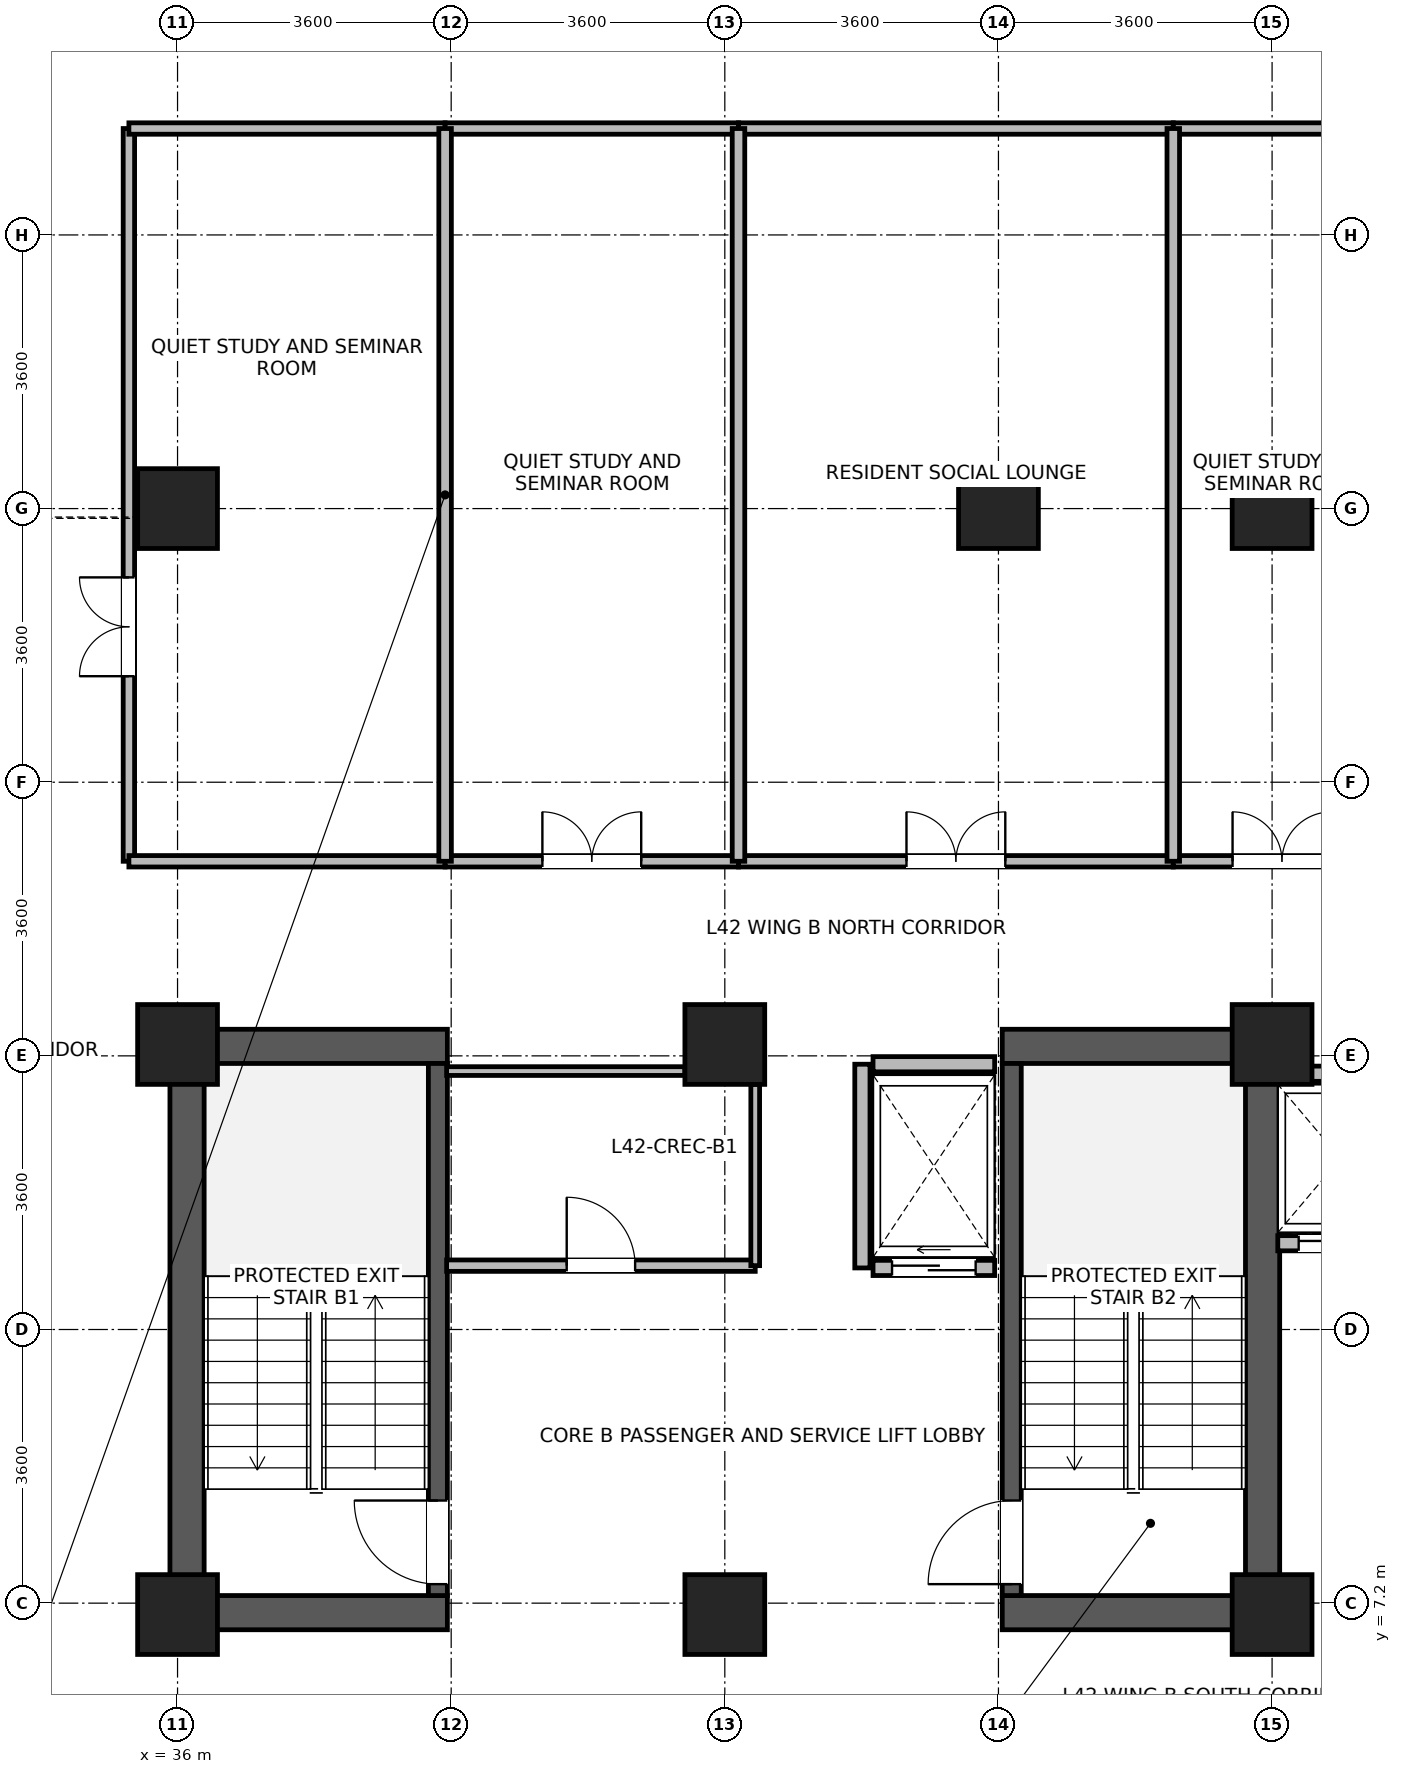
"""IFC4 building model, lengths in metres.
Left out: names, types, materials, properties, quantities, classifications, styles, units other than length and angle.
Written with IfcOpenShell. Run it as: python <this file> out.ifc"""

import sys

from ifc_helpers import new_model, si_unit, direction, frame, frame_2d, origin, origin_2d, place, context, subcontext, project, spatial, rectangle, extrude, source, transform, mapped, element, fill, save


model = new_model("IFC4")
c1 = context("Model", 3, precision=1e-05, world=origin(), true_north=direction((0.0, 1.0)))
c2 = subcontext(c1, "Body", "Model", "MODEL_VIEW")
j1 = project(units=[si_unit("LENGTHUNIT", "METRE"), si_unit("PLANEANGLEUNIT", "RADIAN")], contexts=[c1])
p1 = place(None, origin())
s1 = spatial("IfcSite", under=j1, at=p1, CompositionType="ELEMENT")
p2 = place(p1, origin())
s2 = spatial("IfcBuilding", under=s1, at=p2, CompositionType="ELEMENT")
p3 = place(p2, frame((0.0, 0.0, 166.1)))
s3 = spatial("IfcBuildingStorey", under=s2, at=p3, CompositionType="ELEMENT", Elevation=166.1)
for number, where, z_axis, x_axis in (
    (1, (36.125, 6.85, 0.0), (0.0, 0.0, 1.0), (0.0, 1.0, 0.0)),
    (2, (50.275, 6.85, 0.0), (0.0, 0.0, 1.0), (0.0, 1.0, 0.0)),
):
    element("IfcWall", number, at=place(p3, frame(where, z_axis=z_axis, x_axis=x_axis)), inside=s3, PredefinedType="SHEAR", context=c2, shape_type="SweptSolid", body=[
        extrude(rectangle(XDim=7.9, YDim=0.45, at=frame_2d((3.95, 0.0))), origin(), (0.0, 0.0, 1.0), 3.46),
    ])
for number, where, z_axis, x_axis in (
    (3, (36.35, 7.075, 0.0), (0.0, 0.0, 1.0), (1.0, 0.0, 0.0)),
    (4, (46.85, 7.075, 0.0), (0.0, 0.0, 1.0), (1.0, 0.0, 0.0)),
    (5, (36.35, 14.525, 0.0), (0.0, 0.0, 1.0), (1.0, 0.0, 0.0)),
    (6, (46.85, 14.525, 0.0), (0.0, 0.0, 1.0), (1.0, 0.0, 0.0)),
):
    element("IfcWall", number, at=place(p3, frame(where, z_axis=z_axis, x_axis=x_axis)), inside=s3, PredefinedType="SHEAR", context=c2, shape_type="SweptSolid", body=[
        extrude(rectangle(XDim=3.2, YDim=0.45, at=frame_2d((1.6, 0.0))), origin(), (0.0, 0.0, 1.0), 3.46),
    ])
p4 = place(p3, frame((39.425, 7.3, 0.0), z_axis=(0.0, 0.0, 1.0), x_axis=(0.0, 1.0, 0.0)))
e7 = element("IfcWall", 7, at=p4, inside=s3, PredefinedType="SHEAR", context=c2, shape_type="SweptSolid", body=[
    extrude(rectangle(XDim=7.0, YDim=0.25, at=frame_2d((3.5, 0.0))), origin(), (0.0, 0.0, 1.0), 3.46),
])
p5 = place(p4, frame((0.15, 0.0, 0.0)))
e8 = element("IfcOpeningElement", 8, at=p5, cuts=e7, PredefinedType="OPENING", context=c2, shape_type="SweptSolid", body=[
    extrude(rectangle(XDim=1.1, YDim=2.08, at=frame_2d((0.55, 1.04))), frame((0.0, 0.135, 0.0), z_axis=(0.0, -1.0, 0.0), x_axis=(1.0, 0.0, 0.0)), (0.0, 0.0, 1.0), 0.27),
])
p6 = place(p3, frame((46.975, 7.3, 0.0), z_axis=(0.0, 0.0, 1.0), x_axis=(0.0, 1.0, 0.0)))
e9 = element("IfcWall", 9, at=p6, inside=s3, PredefinedType="SHEAR", context=c2, shape_type="SweptSolid", body=[
    extrude(rectangle(XDim=7.0, YDim=0.25, at=frame_2d((3.5, 0.0))), origin(), (0.0, 0.0, 1.0), 3.46),
])
p7 = place(p6, frame((0.15, 0.0, 0.0)))
e10 = element("IfcOpeningElement", 10, at=p7, cuts=e9, PredefinedType="OPENING", context=c2, shape_type="SweptSolid", body=[
    extrude(rectangle(XDim=1.1, YDim=2.08, at=frame_2d((0.55, 1.04))), frame((0.0, 0.135, 0.0), z_axis=(0.0, -1.0, 0.0), x_axis=(1.0, 0.0, 0.0)), (0.0, 0.0, 1.0), 0.27),
])
m1 = source(origin(), c2, "Body", "SweptSolid", [
    extrude(rectangle(XDim=1.05, YDim=1.05, at=origin_2d()), origin(), (0.0, 0.0, 1.0), 3.7),
])
for number, where, z_axis, x_axis in (
    (11, (36.0, 21.6, 0.0), (0.0, 0.0, 1.0), (1.0, 0.0, 0.0)),
    (12, (46.8, 21.6, 0.0), (0.0, 0.0, 1.0), (1.0, 0.0, 0.0)),
    (13, (36.0, 7.05, 0.0), (0.0, 0.0, 1.0), (1.0, 0.0, 0.0)),
    (14, (36.0, 14.55, 0.0), (0.0, 0.0, 1.0), (1.0, 0.0, 0.0)),
    (15, (43.2, 7.05, 0.0), (0.0, 0.0, 1.0), (1.0, 0.0, 0.0)),
    (16, (43.2, 14.55, 0.0), (0.0, 0.0, 1.0), (1.0, 0.0, 0.0)),
    (17, (50.4, 7.05, 0.0), (0.0, 0.0, 1.0), (1.0, 0.0, 0.0)),
    (18, (50.4, 14.55, 0.0), (0.0, 0.0, 1.0), (1.0, 0.0, 0.0)),
    (19, (50.4, 21.6, 0.0), (0.0, 0.0, 1.0), (1.0, 0.0, 0.0)),
):
    element("IfcColumn", number, at=place(p3, frame(where, z_axis=z_axis, x_axis=x_axis)), inside=s3, PredefinedType="COLUMN", context=c2, shape_type="MappedRepresentation", body=[
        mapped(m1, transform((0.0, 0.0, 0.0), x_axis=(1.0, 0.0, 0.0), y_axis=(0.0, 1.0, 0.0), z_axis=(0.0, 0.0, 1.0), scale=1.0)),
    ])
p8 = place(p3, frame((50.475, 11.935, 0.0), z_axis=(0.0, 0.0, 1.0), x_axis=(1.0, 0.0, 0.0)))
e20 = element("IfcWall", 20, at=p8, inside=s3, PredefinedType="PARTITIONING", context=c2, shape_type="SweptSolid", body=[
    extrude(rectangle(XDim=1.65, YDim=0.2, at=frame_2d((0.825, 0.0))), origin(), (0.0, 0.0, 1.0), 3.44),
])
p9 = place(p8, frame((0.275, 0.0, 0.0)))
e21 = element("IfcOpeningElement", 21, at=p9, cuts=e20, PredefinedType="OPENING", context=c2, shape_type="SweptSolid", body=[
    extrude(rectangle(XDim=1.1, YDim=2.12, at=frame_2d((0.55, 1.06))), frame((0.0, 0.11, 0.0), z_axis=(0.0, -1.0, 0.0), x_axis=(1.0, 0.0, 0.0)), (0.0, 0.0, 1.0), 0.22),
])
p10 = place(p3, frame((50.475, 14.165, 0.0), z_axis=(0.0, 0.0, 1.0), x_axis=(1.0, 0.0, 0.0)))
e22 = element("IfcWall", 22, at=p10, inside=s3, PredefinedType="PARTITIONING", context=c2, shape_type="SweptSolid", body=[
    extrude(rectangle(XDim=1.65, YDim=0.2, at=frame_2d((0.825, 0.0))), origin(), (0.0, 0.0, 1.0), 3.44),
])
p11 = place(p3, frame((45.15, 11.61, 0.0), z_axis=(0.0, 0.0, 1.0), x_axis=(1.0, 0.0, 0.0)))
e23 = element("IfcWall", 23, at=p11, inside=s3, PredefinedType="PARTITIONING", context=c2, shape_type="SweptSolid", body=[
    extrude(rectangle(XDim=1.6, YDim=0.2, at=frame_2d((0.8, 0.0))), origin(), (0.0, 0.0, 1.0), 3.44),
])
p12 = place(p11, frame((0.25, 0.0, 0.0)))
e24 = element("IfcOpeningElement", 24, at=p12, cuts=e23, PredefinedType="OPENING", context=c2, shape_type="SweptSolid", body=[
    extrude(rectangle(XDim=1.1, YDim=2.12, at=frame_2d((0.55, 1.06))), frame((0.0, 0.11, 0.0), z_axis=(0.0, -1.0, 0.0), x_axis=(1.0, 0.0, 0.0)), (0.0, 0.0, 1.0), 0.22),
])
p13 = place(p3, frame((45.15, 14.29, 0.0), z_axis=(0.0, 0.0, 1.0), x_axis=(1.0, 0.0, 0.0)))
e25 = element("IfcWall", 25, at=p13, inside=s3, PredefinedType="PARTITIONING", context=c2, shape_type="SweptSolid", body=[
    extrude(rectangle(XDim=1.6, YDim=0.2, at=frame_2d((0.8, 0.0))), origin(), (0.0, 0.0, 1.0), 2.44),
])
p14 = place(p3, frame((45.01, 11.61, 0.0), z_axis=(0.0, 0.0, 1.0), x_axis=(0.0, 1.0, 0.0)))
e26 = element("IfcWall", 26, at=p14, inside=s3, PredefinedType="PARTITIONING", context=c2, shape_type="SweptSolid", body=[
    extrude(rectangle(XDim=2.68, YDim=0.2, at=frame_2d((1.34, 0.0))), origin(), (0.0, 0.0, 1.0), 3.44),
])
p15 = place(p3, frame((35.36, 16.96, 0.0), z_axis=(0.0, 0.0, 1.0), x_axis=(0.0, 1.0, 0.0)))
e27 = element("IfcWall", 27, at=p15, inside=s3, PredefinedType="PARTITIONING", context=c2, shape_type="SweptSolid", body=[
    extrude(rectangle(XDim=9.64, YDim=0.15, at=frame_2d((4.82, 0.0))), origin(), (0.0, 0.0, 1.0), 3.44),
])
p16 = place(p15, frame((2.435, 0.0, 0.0)))
e28 = element("IfcOpeningElement", 28, at=p16, cuts=e27, PredefinedType="OPENING", context=c2, shape_type="SweptSolid", body=[
    extrude(rectangle(XDim=1.3, YDim=2.12, at=frame_2d((0.65, 1.06))), frame((0.0, 0.085, 0.0), z_axis=(0.0, -1.0, 0.0), x_axis=(1.0, 0.0, 0.0)), (0.0, 0.0, 1.0), 0.17),
])
p17 = place(p3, frame((43.38, 16.96, 0.0), z_axis=(0.0, 0.0, 1.0), x_axis=(1.0, 0.0, 0.0)))
e29 = element("IfcWall", 29, at=p17, inside=s3, PredefinedType="PARTITIONING", context=c2, shape_type="SweptSolid", body=[
    extrude(rectangle(XDim=5.72, YDim=0.15, at=frame_2d((2.86, 0.0))), origin(), (0.0, 0.0, 1.0), 3.44),
])
p18 = place(p17, frame((2.21, 0.0, 0.0)))
e30 = element("IfcOpeningElement", 30, at=p18, cuts=e29, PredefinedType="OPENING", context=c2, shape_type="SweptSolid", body=[
    extrude(rectangle(XDim=1.3, YDim=2.12, at=frame_2d((0.65, 1.06))), frame((0.0, 0.085, 0.0), z_axis=(0.0, -1.0, 0.0), x_axis=(1.0, 0.0, 0.0)), (0.0, 0.0, 1.0), 0.17),
])
p19 = place(p3, frame((43.38, 26.6, 0.0), z_axis=(0.0, 0.0, 1.0), x_axis=(1.0, 0.0, 0.0)))
e31 = element("IfcWall", 31, at=p19, inside=s3, PredefinedType="PARTITIONING", context=c2, shape_type="SweptSolid", body=[
    extrude(rectangle(XDim=5.72, YDim=0.15, at=frame_2d((2.86, 0.0))), origin(), (0.0, 0.0, 1.0), 3.44),
])
for number, where, z_axis, x_axis in (
    (32, (35.36, 16.96, 0.0), (0.0, 0.0, 1.0), (1.0, 0.0, 0.0)),
    (33, (35.36, 26.6, 0.0), (0.0, 0.0, 1.0), (1.0, 0.0, 0.0)),
):
    element("IfcWall", number, at=place(p3, frame(where, z_axis=z_axis, x_axis=x_axis)), inside=s3, PredefinedType="PARTITIONING", context=c2, shape_type="SweptSolid", body=[
        extrude(rectangle(XDim=4.16, YDim=0.15, at=frame_2d((2.08, 0.0))), origin(), (0.0, 0.0, 1.0), 3.44),
    ])
p20 = place(p3, frame((39.54, 11.64, 0.0), z_axis=(0.0, 0.0, 1.0), x_axis=(1.0, 0.0, 0.0)))
e34 = element("IfcWall", 34, at=p20, inside=s3, PredefinedType="PARTITIONING", context=c2, shape_type="SweptSolid", body=[
    extrude(rectangle(XDim=4.06, YDim=0.15, at=frame_2d((2.03, 0.0))), origin(), (0.0, 0.0, 1.0), 3.44),
])
p21 = place(p20, frame((1.58, 0.0, 0.0)))
e35 = element("IfcOpeningElement", 35, at=p21, cuts=e34, PredefinedType="OPENING", context=c2, shape_type="SweptSolid", body=[
    extrude(rectangle(XDim=0.9, YDim=2.08, at=frame_2d((0.45, 1.04))), frame((0.0, 0.085, 0.0), z_axis=(0.0, -1.0, 0.0), x_axis=(1.0, 0.0, 0.0)), (0.0, 0.0, 1.0), 0.17),
])
p22 = place(p3, frame((39.52, 16.96, 0.0), z_axis=(0.0, 0.0, 1.0), x_axis=(1.0, 0.0, 0.0)))
e36 = element("IfcWall", 36, at=p22, inside=s3, PredefinedType="PARTITIONING", context=c2, shape_type="SweptSolid", body=[
    extrude(rectangle(XDim=3.86, YDim=0.15, at=frame_2d((1.93, 0.0))), origin(), (0.0, 0.0, 1.0), 3.44),
])
p23 = place(p22, frame((1.28, 0.0, 0.0)))
e37 = element("IfcOpeningElement", 37, at=p23, cuts=e36, PredefinedType="OPENING", context=c2, shape_type="SweptSolid", body=[
    extrude(rectangle(XDim=1.3, YDim=2.12, at=frame_2d((0.65, 1.06))), frame((0.0, 0.085, 0.0), z_axis=(0.0, -1.0, 0.0), x_axis=(1.0, 0.0, 0.0)), (0.0, 0.0, 1.0), 0.17),
])
p24 = place(p3, frame((39.52, 26.6, 0.0), z_axis=(0.0, 0.0, 1.0), x_axis=(1.0, 0.0, 0.0)))
e38 = element("IfcWall", 38, at=p24, inside=s3, PredefinedType="PARTITIONING", context=c2, shape_type="SweptSolid", body=[
    extrude(rectangle(XDim=3.86, YDim=0.15, at=frame_2d((1.93, 0.0))), origin(), (0.0, 0.0, 1.0), 3.44),
])
p25 = place(p3, frame((49.1, 16.96, 0.0), z_axis=(0.0, 0.0, 1.0), x_axis=(1.0, 0.0, 0.0)))
e39 = element("IfcWall", 39, at=p25, inside=s3, PredefinedType="PARTITIONING", context=c2, shape_type="SweptSolid", body=[
    extrude(rectangle(XDim=2.86, YDim=0.15, at=frame_2d((1.43, 0.0))), origin(), (0.0, 0.0, 1.0), 3.44),
])
p26 = place(p25, frame((0.78, 0.0, 0.0)))
e40 = element("IfcOpeningElement", 40, at=p26, cuts=e39, PredefinedType="OPENING", context=c2, shape_type="SweptSolid", body=[
    extrude(rectangle(XDim=1.3, YDim=2.12, at=frame_2d((0.65, 1.06))), frame((0.0, 0.085, 0.0), z_axis=(0.0, -1.0, 0.0), x_axis=(1.0, 0.0, 0.0)), (0.0, 0.0, 1.0), 0.17),
])
p27 = place(p3, frame((49.1, 26.6, 0.0), z_axis=(0.0, 0.0, 1.0), x_axis=(1.0, 0.0, 0.0)))
e41 = element("IfcWall", 41, at=p27, inside=s3, PredefinedType="PARTITIONING", context=c2, shape_type="SweptSolid", body=[
    extrude(rectangle(XDim=2.86, YDim=0.15, at=frame_2d((1.43, 0.0))), origin(), (0.0, 0.0, 1.0), 3.44),
])
for number, where, z_axis, x_axis in (
    (42, (39.52, 16.96, 0.0), (0.0, 0.0, 1.0), (0.0, 1.0, 0.0)),
    (43, (43.38, 16.96, 0.0), (0.0, 0.0, 1.0), (0.0, 1.0, 0.0)),
    (44, (49.1, 16.96, 0.0), (0.0, 0.0, 1.0), (0.0, 1.0, 0.0)),
):
    element("IfcWall", number, at=place(p3, frame(where, z_axis=z_axis, x_axis=x_axis)), inside=s3, PredefinedType="PARTITIONING", context=c2, shape_type="SweptSolid", body=[
        extrude(rectangle(XDim=9.64, YDim=0.165, at=frame_2d((4.82, 0.0))), origin(), (0.0, 0.0, 1.0), 3.44),
    ])
p28 = place(p3, frame((39.54, 14.2, 0.0), z_axis=(0.0, 0.0, 1.0), x_axis=(1.0, 0.0, 0.0)))
e45 = element("IfcWall", 45, at=p28, inside=s3, PredefinedType="PARTITIONING", context=c2, shape_type="SweptSolid", body=[
    extrude(rectangle(XDim=3.135, YDim=0.115, at=frame_2d((1.567, 0.0))), origin(), (0.0, 0.0, 1.0), 2.44),
])
p29 = place(p3, frame((43.6, 11.64, 0.0), z_axis=(0.0, 0.0, 1.0), x_axis=(0.0, 1.0, 0.0)))
e46 = element("IfcWall", 46, at=p29, inside=s3, PredefinedType="PARTITIONING", context=c2, shape_type="SweptSolid", body=[
    extrude(rectangle(XDim=2.385, YDim=0.115, at=frame_2d((1.192, 0.0))), origin(), (0.0, 0.0, 1.0), 3.44),
])
p30 = place(p5, origin())
e47 = element("IfcDoor", 47, at=p30, inside=s3, OperationType="SINGLE_SWING_RIGHT", PredefinedType="DOOR", context=c2, shape_type="SweptSolid", body=[
    extrude(rectangle(XDim=1.1, YDim=2.08, at=frame_2d((0.55, 1.04))), frame((0.0, 0.025, 0.0), z_axis=(0.0, -1.0, 0.0), x_axis=(1.0, 0.0, 0.0)), (0.0, 0.0, 1.0), 0.05),
])
fill(e8, e47)
p31 = place(p7, origin())
e48 = element("IfcDoor", 48, at=p31, inside=s3, OperationType="SINGLE_SWING_LEFT", PredefinedType="DOOR", context=c2, shape_type="SweptSolid", body=[
    extrude(rectangle(XDim=1.1, YDim=2.08, at=frame_2d((0.55, 1.04))), frame((0.0, 0.025, 0.0), z_axis=(0.0, -1.0, 0.0), x_axis=(1.0, 0.0, 0.0)), (0.0, 0.0, 1.0), 0.05),
])
fill(e10, e48)
p32 = place(p9, origin())
e49 = element("IfcDoor", 49, at=p32, inside=s3, OperationType="SLIDING_TO_LEFT", PredefinedType="DOOR", context=c2, shape_type="SweptSolid", body=[
    extrude(rectangle(XDim=1.1, YDim=2.12, at=frame_2d((0.55, 1.06))), frame((0.0, 0.025, 0.0), z_axis=(0.0, -1.0, 0.0), x_axis=(1.0, 0.0, 0.0)), (0.0, 0.0, 1.0), 0.05),
])
fill(e21, e49)
p33 = place(p12, origin())
e50 = element("IfcDoor", 50, at=p33, inside=s3, OperationType="SLIDING_TO_LEFT", PredefinedType="DOOR", context=c2, shape_type="SweptSolid", body=[
    extrude(rectangle(XDim=1.1, YDim=2.12, at=frame_2d((0.55, 1.06))), frame((0.0, 0.025, 0.0), z_axis=(0.0, -1.0, 0.0), x_axis=(1.0, 0.0, 0.0)), (0.0, 0.0, 1.0), 0.05),
])
fill(e24, e50)
p34 = place(p16, origin())
e51 = element("IfcDoor", 51, at=p34, inside=s3, OperationType="DOUBLE_DOOR_SINGLE_SWING", PredefinedType="DOOR", context=c2, shape_type="SweptSolid", body=[
    extrude(rectangle(XDim=1.3, YDim=2.12, at=frame_2d((0.65, 1.06))), frame((0.0, 0.025, 0.0), z_axis=(0.0, -1.0, 0.0), x_axis=(1.0, 0.0, 0.0)), (0.0, 0.0, 1.0), 0.05),
])
fill(e28, e51)
p35 = place(p18, origin())
e52 = element("IfcDoor", 52, at=p35, inside=s3, OperationType="DOUBLE_DOOR_SINGLE_SWING", PredefinedType="DOOR", context=c2, shape_type="SweptSolid", body=[
    extrude(rectangle(XDim=1.3, YDim=2.12, at=frame_2d((0.65, 1.06))), frame((0.0, 0.025, 0.0), z_axis=(0.0, -1.0, 0.0), x_axis=(1.0, 0.0, 0.0)), (0.0, 0.0, 1.0), 0.05),
])
fill(e30, e52)
p36 = place(p21, origin())
e53 = element("IfcDoor", 53, at=p36, inside=s3, OperationType="SINGLE_SWING_LEFT", PredefinedType="DOOR", context=c2, shape_type="SweptSolid", body=[
    extrude(rectangle(XDim=0.9, YDim=2.08, at=frame_2d((0.45, 1.04))), frame((0.0, 0.025, 0.0), z_axis=(0.0, -1.0, 0.0), x_axis=(1.0, 0.0, 0.0)), (0.0, 0.0, 1.0), 0.05),
])
fill(e35, e53)
p37 = place(p23, origin())
e54 = element("IfcDoor", 54, at=p37, inside=s3, OperationType="DOUBLE_DOOR_SINGLE_SWING", PredefinedType="DOOR", context=c2, shape_type="SweptSolid", body=[
    extrude(rectangle(XDim=1.3, YDim=2.12, at=frame_2d((0.65, 1.06))), frame((0.0, 0.025, 0.0), z_axis=(0.0, -1.0, 0.0), x_axis=(1.0, 0.0, 0.0)), (0.0, 0.0, 1.0), 0.05),
])
fill(e37, e54)
p38 = place(p26, origin())
e55 = element("IfcDoor", 55, at=p38, inside=s3, OperationType="DOUBLE_DOOR_SINGLE_SWING", PredefinedType="DOOR", context=c2, shape_type="SweptSolid", body=[
    extrude(rectangle(XDim=1.3, YDim=2.12, at=frame_2d((0.65, 1.06))), frame((0.0, 0.025, 0.0), z_axis=(0.0, -1.0, 0.0), x_axis=(1.0, 0.0, 0.0)), (0.0, 0.0, 1.0), 0.05),
])
fill(e40, e55)
save(model, sys.argv[1])
